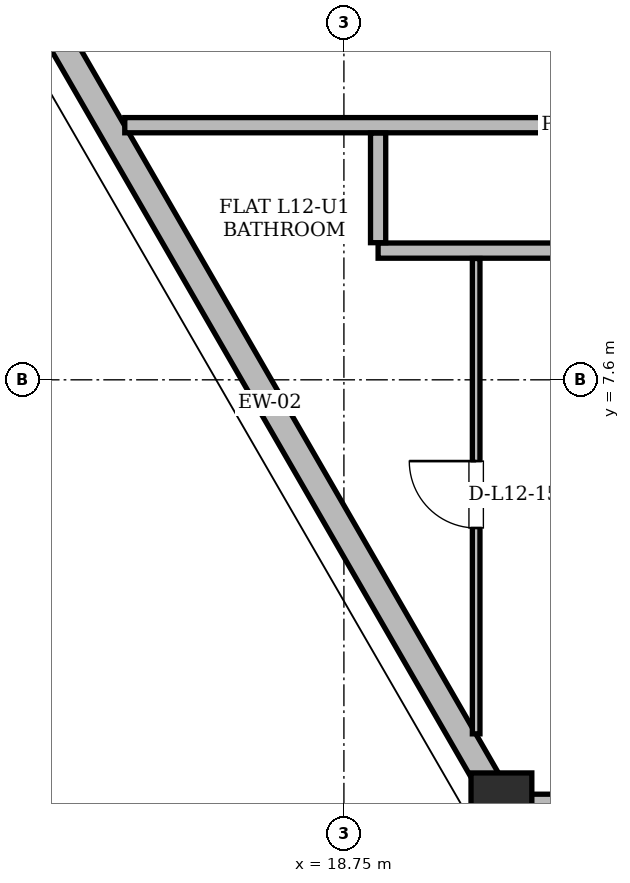
"""IFC4 building model, lengths in metres.
Left out: names, types, materials, properties, quantities, classifications, styles, units other than length and angle.
Written with IfcOpenShell. Run it as: python <this file> out.ifc"""

import sys

from ifc_helpers import new_model, si_unit, direction, frame, frame_2d, origin, origin_2d, place, context, subcontext, project, spatial, rectangle, hollow_rectangle, extrude, element, fill, save


model = new_model("IFC4")
c1 = context("Model", 3, precision=1e-05, world=origin(), true_north=direction((0.0, 1.0)))
c2 = subcontext(c1, "Body", "Model", "MODEL_VIEW")
j1 = project(units=[si_unit("LENGTHUNIT", "METRE"), si_unit("PLANEANGLEUNIT", "RADIAN")], contexts=[c1])
p1 = place(None, origin())
s1 = spatial("IfcSite", under=j1, at=p1, CompositionType="ELEMENT")
p2 = place(p1, origin())
s2 = spatial("IfcBuilding", under=s1, at=p2, CompositionType="ELEMENT")
p3 = place(p2, frame((0.0, 0.0, 48.9)))
s3 = spatial("IfcBuildingStorey", under=s2, at=p3, CompositionType="ELEMENT", Elevation=48.9)
p4 = place(p3, frame((20.846, 1.978, 0.005), z_axis=(-0.012979185622, 0.027657217529, 0.999533200579), x_axis=(-0.905271861063, -0.424832740696, 0.0)))
e1 = element("IfcColumn", 1, at=p4, inside=s3, PredefinedType="COLUMN", context=c2, shape_type="SweptSolid", body=[
    extrude(hollow_rectangle(XDim=0.8, YDim=0.8, WallThickness=0.065, at=origin_2d()), origin(), (0.0, 0.0, 1.0), 3.593),
])
p5 = place(p3, frame((13.479, 14.738, 0.0), z_axis=(0.0, 0.0, 1.0), x_axis=(0.499999290135, -0.866025813625, 0.0)))
e2 = element("IfcWall", 2, at=p5, inside=s3, PredefinedType="SOLIDWALL", context=c2, shape_type="SweptSolid", body=[
    extrude(rectangle(XDim=14.733, YDim=0.34, at=frame_2d((7.367, 0.0))), origin(), (0.0, 0.0, 1.0), 2.494),
])
p6 = place(p5, frame((1.251, 0.0, 1.28)))
e3 = element("IfcOpeningElement", 3, at=p6, cuts=e2, PredefinedType="OPENING", context=c2, shape_type="SweptSolid", body=[
    extrude(rectangle(XDim=0.85, YDim=0.92, at=frame_2d((0.425, 0.46))), frame((0.0, 0.17, 0.0), z_axis=(0.0, -1.0, 0.0), x_axis=(1.0, 0.0, 0.0)), (0.0, 0.0, 1.0), 0.34),
])
p7 = place(p3, frame((20.846, 1.978, 0.0), z_axis=(0.0, 0.0, 1.0), x_axis=(1.0, 0.0, 0.0)))
e4 = element("IfcWall", 4, at=p7, inside=s3, PredefinedType="SOLIDWALL", context=c2, shape_type="SweptSolid", body=[
    extrude(rectangle(XDim=14.704, YDim=0.34, at=frame_2d((7.352, 0.0))), origin(), (0.0, 0.0, 1.0), 2.494),
])
p8 = place(p7, frame((6.159, 0.0, 0.0)))
e5 = element("IfcOpeningElement", 5, at=p8, cuts=e4, PredefinedType="OPENING", context=c2, shape_type="SweptSolid", body=[
    extrude(rectangle(XDim=1.5, YDim=2.2, at=frame_2d((0.75, 1.1))), frame((0.0, 0.17, 0.0), z_axis=(0.0, -1.0, 0.0), x_axis=(1.0, 0.0, 0.0)), (0.0, 0.0, 1.0), 0.34),
])
p9 = place(p7, frame((1.575, 0.0, 0.85)))
e6 = element("IfcOpeningElement", 6, at=p9, cuts=e4, PredefinedType="OPENING", context=c2, shape_type="SweptSolid", body=[
    extrude(rectangle(XDim=2.2, YDim=1.534, at=frame_2d((1.1, 0.767))), frame((0.0, 0.17, 0.0), z_axis=(0.0, -1.0, 0.0), x_axis=(1.0, 0.0, 0.0)), (0.0, 0.0, 1.0), 0.34),
])
p10 = place(p7, frame((11.379, 0.0, 0.85)))
e7 = element("IfcOpeningElement", 7, at=p10, cuts=e4, PredefinedType="OPENING", context=c2, shape_type="SweptSolid", body=[
    extrude(rectangle(XDim=1.6, YDim=1.534, at=frame_2d((0.8, 0.767))), frame((0.0, 0.17, 0.0), z_axis=(0.0, -1.0, 0.0), x_axis=(1.0, 0.0, 0.0)), (0.0, 0.0, 1.0), 0.34),
])
p11 = place(p3, frame((19.2, 9.3, 0.0), z_axis=(0.0, 0.0, 1.0), x_axis=(1.0, 0.0, 0.0)))
e8 = element("IfcWall", 8, at=p11, inside=s3, PredefinedType="PARTITIONING", context=c2, shape_type="SweptSolid", body=[
    extrude(rectangle(XDim=36.6, YDim=0.2, at=frame_2d((18.3, 0.0))), origin(), (0.0, 0.0, 1.0), 2.738),
])
p12 = place(p11, frame((8.527, 0.0, 0.0)))
e9 = element("IfcOpeningElement", 9, at=p12, cuts=e8, PredefinedType="OPENING", context=c2, shape_type="SweptSolid", body=[
    extrude(rectangle(XDim=1.0, YDim=2.18, at=frame_2d((0.5, 1.09))), frame((0.0, 0.1, 0.0), z_axis=(0.0, -1.0, 0.0), x_axis=(1.0, 0.0, 0.0)), (0.0, 0.0, 1.0), 0.2),
])
p13 = place(p11, frame((24.062, 0.0, 0.0)))
e10 = element("IfcOpeningElement", 10, at=p13, cuts=e8, PredefinedType="OPENING", context=c2, shape_type="SweptSolid", body=[
    extrude(rectangle(XDim=1.0, YDim=2.18, at=frame_2d((0.5, 1.09))), frame((0.0, 0.1, 0.0), z_axis=(0.0, -1.0, 0.0), x_axis=(1.0, 0.0, 0.0)), (0.0, 0.0, 1.0), 0.2),
])
p14 = place(p11, frame((31.904, 0.0, 0.0)))
e11 = element("IfcOpeningElement", 11, at=p14, cuts=e8, PredefinedType="OPENING", context=c2, shape_type="SweptSolid", body=[
    extrude(rectangle(XDim=1.0, YDim=2.18, at=frame_2d((0.5, 1.09))), frame((0.0, 0.1, 0.0), z_axis=(0.0, -1.0, 0.0), x_axis=(1.0, 0.0, 0.0)), (0.0, 0.0, 1.0), 0.2),
])
p15 = place(p3, frame((15.867, 10.95, 0.0), z_axis=(0.0, 0.0, 1.0), x_axis=(1.0, 0.0, 0.0)))
e12 = element("IfcWall", 12, at=p15, inside=s3, PredefinedType="PARTITIONING", context=c2, shape_type="SweptSolid", body=[
    extrude(rectangle(XDim=11.683, YDim=0.2, at=frame_2d((5.842, 0.0))), origin(), (0.0, 0.0, 1.0), 3.36),
])
p16 = place(p3, frame((19.2, 9.404, 0.0), z_axis=(0.0, 0.0, 1.0), x_axis=(0.0, 1.0, 0.0)))
e13 = element("IfcWall", 13, at=p16, inside=s3, PredefinedType="PARTITIONING", context=c2, shape_type="SweptSolid", body=[
    extrude(rectangle(XDim=1.442, YDim=0.2, at=frame_2d((0.721, 0.0))), origin(), (0.0, 0.0, 1.0), 3.36),
])
p17 = place(p3, frame((20.49, 2.942, 0.0), z_axis=(0.0, 0.0, 1.0), x_axis=(0.0, 1.0, 0.0)))
e14 = element("IfcWall", 14, at=p17, inside=s3, PredefinedType="PARTITIONING", context=c2, shape_type="SweptSolid", body=[
    extrude(rectangle(XDim=6.254, YDim=0.1, at=frame_2d((3.127, 0.0))), origin(), (0.0, 0.0, 1.0), 3.36),
])
p18 = place(p17, frame((2.708, 0.0, 0.0)))
e15 = element("IfcOpeningElement", 15, at=p18, cuts=e14, PredefinedType="OPENING", context=c2, shape_type="SweptSolid", body=[
    extrude(rectangle(XDim=0.88, YDim=2.08, at=frame_2d((0.44, 1.04))), frame((0.0, 0.05, 0.0), z_axis=(0.0, -1.0, 0.0), x_axis=(1.0, 0.0, 0.0)), (0.0, 0.0, 1.0), 0.1),
])
p19 = place(p18, origin())
e16 = element("IfcDoor", 16, at=p19, inside=s3, OperationType="SINGLE_SWING_RIGHT", PredefinedType="DOOR", context=c2, shape_type="SweptSolid", body=[
    extrude(rectangle(XDim=0.88, YDim=2.08, at=frame_2d((0.44, 1.04))), frame((0.0, 0.025, 0.0), z_axis=(0.0, -1.0, 0.0), x_axis=(1.0, 0.0, 0.0)), (0.0, 0.0, 1.0), 0.05),
])
fill(e15, e16)
save(model, sys.argv[1])
